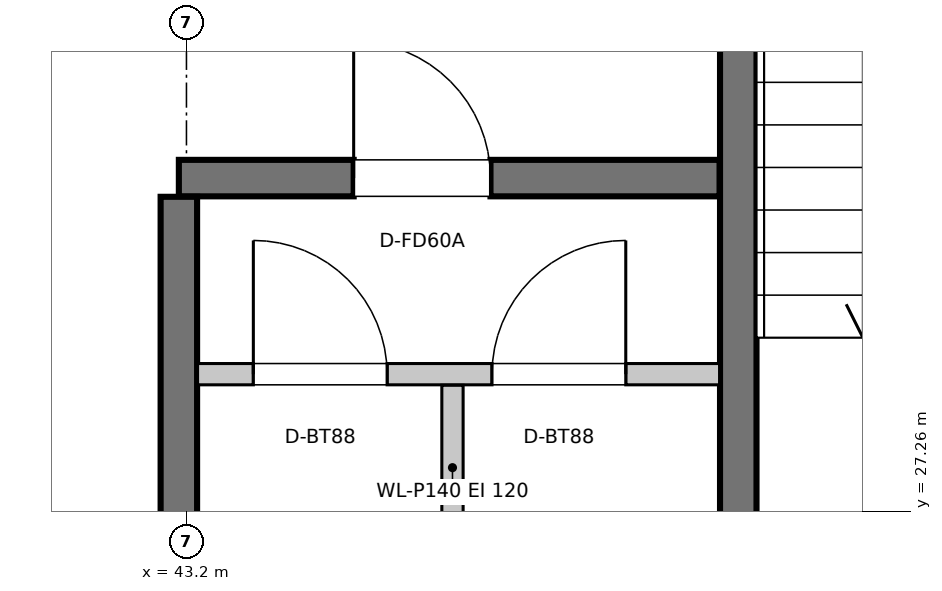
"""IFC4 building model, lengths in metres.
Left out: names, types, materials, properties, quantities, classifications, styles, units other than length and angle.
Written with IfcOpenShell. Run it as: python <this file> out.ifc"""

import sys

from ifc_helpers import new_model, si_unit, direction, frame, frame_2d, origin, place, context, subcontext, project, spatial, rectangle, extrude, element, fill, save


model = new_model("IFC4")
c1 = context("Model", 3, precision=1e-05, world=origin(), true_north=direction((0.0, 1.0)))
c2 = subcontext(c1, "Body", "Model", "MODEL_VIEW")
j1 = project(units=[si_unit("LENGTHUNIT", "METRE"), si_unit("PLANEANGLEUNIT", "RADIAN")], contexts=[c1])
p1 = place(None, origin())
s1 = spatial("IfcSite", under=j1, at=p1, CompositionType="ELEMENT")
p2 = place(p1, origin())
s2 = spatial("IfcBuilding", under=s1, at=p2, CompositionType="ELEMENT")
p3 = place(p2, frame((0.0, 0.0, 105.95)))
s3 = spatial("IfcBuildingStorey", under=s2, at=p3, CompositionType="ELEMENT", Elevation=105.95)
p4 = place(p3, frame((46.83, 27.003, 0.0), z_axis=(0.0, 0.0, 1.0), x_axis=(0.0, 1.0, 0.0)))
e1 = element("IfcWall", 1, at=p4, inside=s3, PredefinedType="SHEAR", context=c2, shape_type="SweptSolid", body=[
    extrude(rectangle(XDim=8.294, YDim=0.24, at=frame_2d((4.147, 0.0))), origin(), (0.0, 0.0, 1.0), 4.5),
])
p5 = place(p3, frame((43.15, 29.45, 0.0), z_axis=(0.0, 0.0, 1.0), x_axis=(1.0, 0.0, 0.0)))
e2 = element("IfcWall", 2, at=p5, inside=s3, PredefinedType="SHEAR", context=c2, shape_type="SweptSolid", body=[
    extrude(rectangle(XDim=3.557, YDim=0.24, at=frame_2d((1.779, 0.0))), origin(), (0.0, 0.0, 1.0), 4.5),
])
p6 = place(p5, frame((1.15, 0.0, 0.0)))
e3 = element("IfcOpeningElement", 3, at=p6, cuts=e2, PredefinedType="OPENING", context=c2, shape_type="SweptSolid", body=[
    extrude(rectangle(XDim=0.9, YDim=2.0, at=frame_2d((0.45, 1.0))), frame((0.0, 0.13, 0.0), z_axis=(0.0, -1.0, 0.0), x_axis=(1.0, 0.0, 0.0)), (0.0, 0.0, 1.0), 0.26),
])
p7 = place(p3, frame((43.15, 27.003, 0.0), z_axis=(0.0, 0.0, 1.0), x_axis=(0.0, 1.0, 0.0)))
e4 = element("IfcWall", 4, at=p7, inside=s3, PredefinedType="SHEAR", context=c2, shape_type="SweptSolid", body=[
    extrude(rectangle(XDim=2.324, YDim=0.24, at=frame_2d((1.162, 0.0))), origin(), (0.0, 0.0, 1.0), 4.5),
])
p8 = place(p3, frame((43.273, 28.16, 0.0), z_axis=(0.0, 0.0, 1.0), x_axis=(1.0, 0.0, 0.0)))
e5 = element("IfcWall", 5, at=p8, inside=s3, PredefinedType="PARTITIONING", context=c2, shape_type="SweptSolid", body=[
    extrude(rectangle(XDim=3.434, YDim=0.14, at=frame_2d((1.717, 0.0))), origin(), (0.0, 0.0, 1.0), 4.245),
])
p9 = place(p8, frame((0.367, 0.0, 0.0)))
e6 = element("IfcOpeningElement", 6, at=p9, cuts=e5, PredefinedType="OPENING", context=c2, shape_type="SweptSolid", body=[
    extrude(rectangle(XDim=0.88, YDim=2.02, at=frame_2d((0.44, 1.01))), frame((0.0, 0.08, 0.0), z_axis=(0.0, -1.0, 0.0), x_axis=(1.0, 0.0, 0.0)), (0.0, 0.0, 1.0), 0.16),
])
p10 = place(p8, frame((1.937, 0.0, 0.0)))
e7 = element("IfcOpeningElement", 7, at=p10, cuts=e5, PredefinedType="OPENING", context=c2, shape_type="SweptSolid", body=[
    extrude(rectangle(XDim=0.88, YDim=2.02, at=frame_2d((0.44, 1.01))), frame((0.0, 0.08, 0.0), z_axis=(0.0, -1.0, 0.0), x_axis=(1.0, 0.0, 0.0)), (0.0, 0.0, 1.0), 0.16),
])
p11 = place(p3, frame((44.95, 27.003, 0.0), z_axis=(0.0, 0.0, 1.0), x_axis=(0.0, 1.0, 0.0)))
e8 = element("IfcWall", 8, at=p11, inside=s3, PredefinedType="PARTITIONING", context=c2, shape_type="SweptSolid", body=[
    extrude(rectangle(XDim=1.084, YDim=0.14, at=frame_2d((0.542, 0.0))), origin(), (0.0, 0.0, 1.0), 4.245),
])
p12 = place(p6, origin())
e9 = element("IfcDoor", 9, at=p12, inside=s3, OperationType="SINGLE_SWING_LEFT", PredefinedType="DOOR", context=c2, shape_type="SweptSolid", body=[
    extrude(rectangle(XDim=0.9, YDim=2.0, at=frame_2d((0.45, 1.0))), frame((0.0, 0.025, 0.0), z_axis=(0.0, -1.0, 0.0), x_axis=(1.0, 0.0, 0.0)), (0.0, 0.0, 1.0), 0.05),
])
fill(e3, e9)
p13 = place(p9, origin())
e10 = element("IfcDoor", 10, at=p13, inside=s3, OperationType="SINGLE_SWING_LEFT", PredefinedType="DOOR", context=c2, shape_type="SweptSolid", body=[
    extrude(rectangle(XDim=0.88, YDim=2.02, at=frame_2d((0.44, 1.01))), frame((0.0, 0.025, 0.0), z_axis=(0.0, -1.0, 0.0), x_axis=(1.0, 0.0, 0.0)), (0.0, 0.0, 1.0), 0.05),
])
fill(e6, e10)
p14 = place(p10, origin())
e11 = element("IfcDoor", 11, at=p14, inside=s3, OperationType="SINGLE_SWING_RIGHT", PredefinedType="DOOR", context=c2, shape_type="SweptSolid", body=[
    extrude(rectangle(XDim=0.88, YDim=2.02, at=frame_2d((0.44, 1.01))), frame((0.0, 0.025, 0.0), z_axis=(0.0, -1.0, 0.0), x_axis=(1.0, 0.0, 0.0)), (0.0, 0.0, 1.0), 0.05),
])
fill(e7, e11)
save(model, sys.argv[1])
